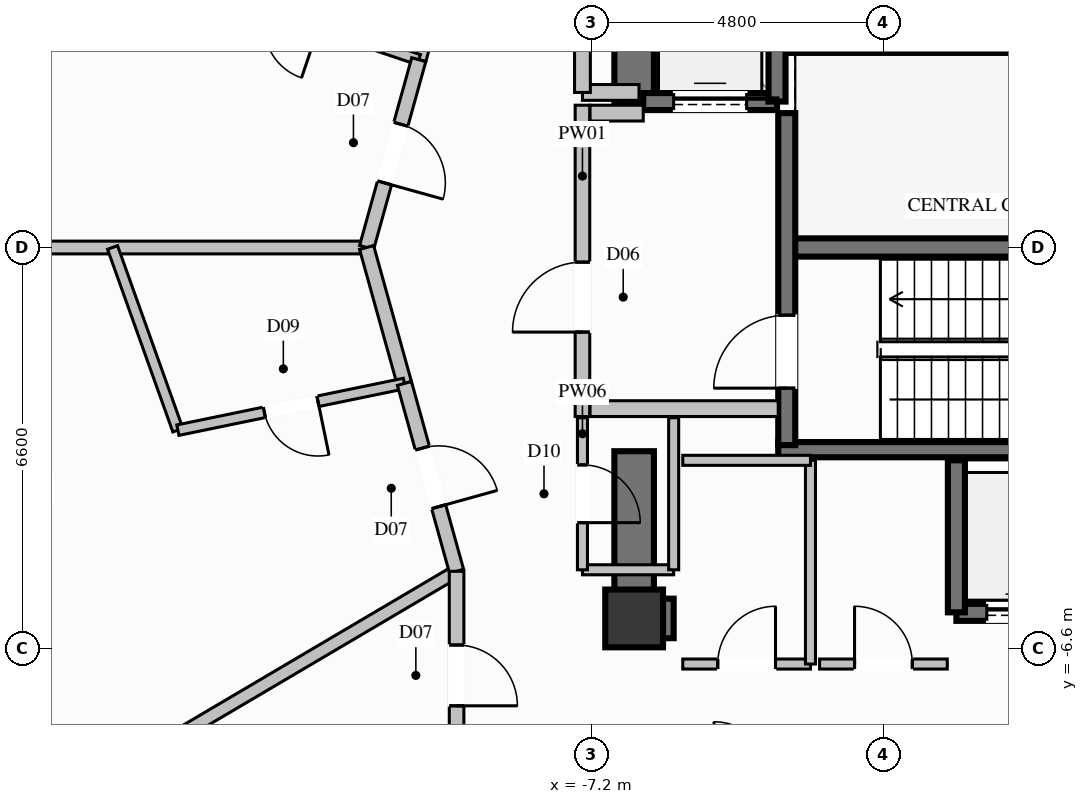
"""IFC4 building model, lengths in metres.
Left out: names, types, materials, properties, quantities, classifications, styles, units other than length and angle.
Written with IfcOpenShell. Run it as: python <this file> out.ifc"""

import sys

from ifc_helpers import new_model, si_unit, direction, frame, frame_2d, origin, origin_2d, place, context, subcontext, project, spatial, rectangle, extrude, element, fill, save


model = new_model("IFC4")
c1 = context("Model", 3, precision=1e-05, world=origin(), true_north=direction((0.0, 1.0)))
c2 = subcontext(c1, "Body", "Model", "MODEL_VIEW")
j1 = project(units=[si_unit("LENGTHUNIT", "METRE"), si_unit("PLANEANGLEUNIT", "RADIAN")], contexts=[c1])
p1 = place(None, origin())
s1 = spatial("IfcSite", under=j1, at=p1, CompositionType="ELEMENT")
p2 = place(p1, origin())
s2 = spatial("IfcBuilding", under=s1, at=p2, CompositionType="ELEMENT")
p3 = place(p2, frame((0.0, 0.0, 131.4)))
s3 = spatial("IfcBuildingStorey", under=s2, at=p3, CompositionType="ELEMENT", Elevation=131.4)
p4 = place(p3, frame((-6.5, -6.1, 0.0), z_axis=(0.0, 0.0, 1.0), x_axis=(1.0, 0.0, 0.0)))
e1 = element("IfcColumn", 1, at=p4, inside=s3, PredefinedType="COLUMN", context=c2, shape_type="SweptSolid", body=[
    extrude(rectangle(XDim=0.95, YDim=0.95, at=origin_2d()), origin(), (0.0, 0.0, 1.0), 3.6),
])
p5 = place(p3, frame((-3.99, 0.0, 0.0), z_axis=(0.0, 0.0, 1.0), x_axis=(1.0, 0.0, 0.0)))
e2 = element("IfcWall", 2, at=p5, inside=s3, PredefinedType="SHEAR", context=c2, shape_type="SweptSolid", body=[
    extrude(rectangle(XDim=7.98, YDim=0.3, at=frame_2d((3.99, 0.0))), origin(), (0.0, 0.0, 1.0), 3.6),
])
for number, where, z_axis, x_axis in (
    (3, (-4.13, -3.325, 0.0), (0.0, 0.0, 1.0), (1.0, 0.0, 0.0)),
    (4, (-4.13, 3.325, 0.0), (0.0, 0.0, 1.0), (1.0, 0.0, 0.0)),
):
    element("IfcWall", number, at=place(p3, frame(where, z_axis=z_axis, x_axis=x_axis)), inside=s3, PredefinedType="SOLIDWALL", context=c2, shape_type="SweptSolid", body=[
        extrude(rectangle(XDim=8.26, YDim=0.25, at=frame_2d((4.13, 0.0))), origin(), (0.0, 0.0, 1.0), 3.6),
    ])
p6 = place(p3, frame((-6.175, -6.1, 0.0), z_axis=(0.0, 0.0, 1.0), x_axis=(1.0, 0.0, 0.0)))
e5 = element("IfcWall", 5, at=p6, inside=s3, PredefinedType="SHEAR", context=c2, shape_type="SweptSolid", body=[
    extrude(rectangle(XDim=0.325, YDim=0.65, at=frame_2d((0.163, 0.0))), origin(), (0.0, 0.0, 1.0), 3.6),
])
p7 = place(p3, frame((-6.5, 2.35, 0.0), z_axis=(0.0, 0.0, 1.0), x_axis=(0.0, 1.0, 0.0)))
e6 = element("IfcWall", 6, at=p7, inside=s3, PredefinedType="SHEAR", context=c2, shape_type="SweptSolid", body=[
    extrude(rectangle(XDim=4.075, YDim=0.65, at=frame_2d((2.038, 0.0))), origin(), (0.0, 0.0, 1.0), 3.6),
])
p8 = place(p3, frame((-6.5, -6.425, 0.0), z_axis=(0.0, 0.0, 1.0), x_axis=(0.0, 1.0, 0.0)))
e7 = element("IfcWall", 7, at=p8, inside=s3, PredefinedType="SHEAR", context=c2, shape_type="SweptSolid", body=[
    extrude(rectangle(XDim=3.075, YDim=0.65, at=frame_2d((1.538, 0.0))), origin(), (0.0, 0.0, 1.0), 3.6),
])
p9 = place(p3, frame((-1.2, -6.0, 0.0), z_axis=(0.0, 0.0, 1.0), x_axis=(1.0, 0.0, 0.0)))
e8 = element("IfcWall", 8, at=p9, inside=s3, PredefinedType="SOLIDWALL", context=c2, shape_type="SweptSolid", body=[
    extrude(rectangle(XDim=2.1, YDim=0.28, at=frame_2d((1.05, 0.0))), origin(), (0.0, 0.0, 1.0), 3.35),
])
p10 = place(p9, frame((0.5, 0.0, 0.0)))
e9 = element("IfcOpeningElement", 9, at=p10, cuts=e8, PredefinedType="OPENING", context=c2, shape_type="SweptSolid", body=[
    extrude(rectangle(XDim=1.1, YDim=2.2, at=frame_2d((0.55, 1.1))), frame((0.0, 0.15, 0.0), z_axis=(0.0, -1.0, 0.0), x_axis=(1.0, 0.0, 0.0)), (0.0, 0.0, 1.0), 0.3),
])
p11 = place(p3, frame((-1.2, -3.5, 0.0), z_axis=(0.0, 0.0, 1.0), x_axis=(0.0, -1.0, 0.0)))
e10 = element("IfcWall", 10, at=p11, inside=s3, PredefinedType="SOLIDWALL", context=c2, shape_type="SweptSolid", body=[
    extrude(rectangle(XDim=2.5, YDim=0.28, at=frame_2d((1.25, 0.0))), origin(), (0.0, 0.0, 1.0), 3.35),
])
p12 = place(p3, frame((-6.35, 2.4, 0.0), z_axis=(0.0, 0.0, 1.0), x_axis=(1.0, 0.0, 0.0)))
e11 = element("IfcWall", 11, at=p12, inside=s3, PredefinedType="SOLIDWALL", context=c2, shape_type="SweptSolid", body=[
    extrude(rectangle(XDim=2.2, YDim=0.28, at=frame_2d((1.1, 0.0))), origin(), (0.0, 0.0, 1.0), 3.35),
])
p13 = place(p12, frame((0.5, 0.0, 0.0)))
e12 = element("IfcOpeningElement", 12, at=p13, cuts=e11, PredefinedType="OPENING", context=c2, shape_type="SweptSolid", body=[
    extrude(rectangle(XDim=1.2, YDim=2.2, at=frame_2d((0.6, 1.1))), frame((0.0, 0.15, 0.0), z_axis=(0.0, -1.0, 0.0), x_axis=(1.0, 0.0, 0.0)), (0.0, 0.0, 1.0), 0.3),
])
p14 = place(p3, frame((-4.15, 2.4, 0.0), z_axis=(0.0, 0.0, 1.0), x_axis=(0.0, 1.0, 0.0)))
e13 = element("IfcWall", 13, at=p14, inside=s3, PredefinedType="SOLIDWALL", context=c2, shape_type="SweptSolid", body=[
    extrude(rectangle(XDim=2.7, YDim=0.28, at=frame_2d((1.35, 0.0))), origin(), (0.0, 0.0, 1.0), 3.35),
])
p15 = place(p3, frame((-3.99, -3.25, 0.0), z_axis=(0.0, 0.0, 1.0), x_axis=(0.0, 1.0, 0.0)))
e14 = element("IfcWall", 14, at=p15, inside=s3, PredefinedType="SOLIDWALL", context=c2, shape_type="SweptSolid", body=[
    extrude(rectangle(XDim=5.46, YDim=0.28, at=frame_2d((2.73, 0.0))), origin(), (0.0, 0.0, 1.0), 3.35),
])
p16 = place(p15, frame((0.937, 0.0, 0.0)))
e15 = element("IfcOpeningElement", 15, at=p16, cuts=e14, PredefinedType="OPENING", context=c2, shape_type="SweptSolid", body=[
    extrude(rectangle(XDim=1.2, YDim=2.2, at=frame_2d((0.6, 1.1))), frame((0.0, 0.15, 0.0), z_axis=(0.0, -1.0, 0.0), x_axis=(1.0, 0.0, 0.0)), (0.0, 0.0, 1.0), 0.3),
])
p17 = place(p3, frame((-7.35, -2.78, 0.0), z_axis=(0.0, 0.0, 1.0), x_axis=(0.0, 1.0, 0.0)))
e16 = element("IfcWall", 16, at=p17, inside=s3, PredefinedType="PARTITIONING", context=c2, shape_type="SweptSolid", body=[
    extrude(rectangle(XDim=5.12, YDim=0.24, at=frame_2d((2.56, 0.0))), origin(), (0.0, 0.0, 1.0), 2.435),
])
p18 = place(p17, frame((1.389, 0.0, 0.0)))
e17 = element("IfcOpeningElement", 17, at=p18, cuts=e16, PredefinedType="OPENING", context=c2, shape_type="SweptSolid", body=[
    extrude(rectangle(XDim=1.15, YDim=2.2, at=frame_2d((0.575, 1.1))), frame((0.0, 0.13, 0.0), z_axis=(0.0, -1.0, 0.0), x_axis=(1.0, 0.0, 0.0)), (0.0, 0.0, 1.0), 0.26),
])
p19 = place(p3, frame((-7.225, -2.65, 0.0), z_axis=(0.0, 0.0, 1.0), x_axis=(1.0, 0.0, 0.0)))
e18 = element("IfcWall", 18, at=p19, inside=s3, PredefinedType="PARTITIONING", context=c2, shape_type="SweptSolid", body=[
    extrude(rectangle(XDim=3.095, YDim=0.26, at=frame_2d((1.548, 0.0))), origin(), (0.0, 0.0, 1.0), 3.35),
])
p20 = place(p3, frame((-7.225, 2.21, 0.0), z_axis=(0.0, 0.0, 1.0), x_axis=(1.0, 0.0, 0.0)))
e19 = element("IfcWall", 19, at=p20, inside=s3, PredefinedType="PARTITIONING", context=c2, shape_type="SweptSolid", body=[
    extrude(rectangle(XDim=0.875, YDim=0.26, at=frame_2d((0.438, 0.0))), origin(), (0.0, 0.0, 1.0), 3.35),
])
p21 = place(p3, frame((-7.35, 2.55, 0.0), z_axis=(0.0, 0.0, 1.0), x_axis=(1.0, 0.0, 0.0)))
e20 = element("IfcWall", 20, at=p21, inside=s3, PredefinedType="PARTITIONING", context=c2, shape_type="SweptSolid", body=[
    extrude(rectangle(XDim=0.93, YDim=0.26, at=frame_2d((0.465, 0.0))), origin(), (0.0, 0.0, 1.0), 3.35),
])
p22 = place(p3, frame((-7.35, 2.55, 0.0), z_axis=(0.0, 0.0, 1.0), x_axis=(0.0, 1.0, 0.0)))
e21 = element("IfcWall", 21, at=p22, inside=s3, PredefinedType="PARTITIONING", context=c2, shape_type="SweptSolid", body=[
    extrude(rectangle(XDim=2.4, YDim=0.26, at=frame_2d((1.2, 0.0))), origin(), (0.0, 0.0, 1.0), 2.435),
])
p23 = place(p22, frame((0.775, 0.0, 0.0)))
e22 = element("IfcOpeningElement", 22, at=p23, cuts=e21, PredefinedType="OPENING", context=c2, shape_type="SweptSolid", body=[
    extrude(rectangle(XDim=0.85, YDim=2.05, at=frame_2d((0.425, 1.025))), frame((0.0, 0.14, 0.0), z_axis=(0.0, -1.0, 0.0), x_axis=(1.0, 0.0, 0.0)), (0.0, 0.0, 1.0), 0.28),
])
p24 = place(p3, frame((-7.35, -5.3, 0.0), z_axis=(0.0, 0.0, 1.0), x_axis=(1.0, 0.0, 0.0)))
e23 = element("IfcWall", 23, at=p24, inside=s3, PredefinedType="PARTITIONING", context=c2, shape_type="SweptSolid", body=[
    extrude(rectangle(XDim=1.5, YDim=0.165, at=frame_2d((0.75, 0.0))), origin(), (0.0, 0.0, 1.0), 2.435),
])
p25 = place(p3, frame((-5.85, -5.3, 0.0), z_axis=(0.0, 0.0, 1.0), x_axis=(0.0, 1.0, 0.0)))
e24 = element("IfcWall", 24, at=p25, inside=s3, PredefinedType="PARTITIONING", context=c2, shape_type="SweptSolid", body=[
    extrude(rectangle(XDim=2.5, YDim=0.165, at=frame_2d((1.25, 0.0))), origin(), (0.0, 0.0, 1.0), 2.435),
])
p26 = place(p3, frame((-7.35, -2.8, 0.0), z_axis=(0.0, 0.0, 1.0), x_axis=(0.0, -1.0, 0.0)))
e25 = element("IfcWall", 25, at=p26, inside=s3, PredefinedType="PARTITIONING", context=c2, shape_type="SweptSolid", body=[
    extrude(rectangle(XDim=2.5, YDim=0.165, at=frame_2d((1.25, 0.0))), origin(), (0.0, 0.0, 1.0), 3.35),
])
p27 = place(p26, frame((0.775, 0.0, 0.0)))
e26 = element("IfcOpeningElement", 26, at=p27, cuts=e25, PredefinedType="OPENING", context=c2, shape_type="SweptSolid", body=[
    extrude(rectangle(XDim=0.95, YDim=2.1, at=frame_2d((0.475, 1.05))), frame((0.0, 0.093, 0.0), z_axis=(0.0, -1.0, 0.0), x_axis=(1.0, 0.0, 0.0)), (0.0, 0.0, 1.0), 0.185),
])
p28 = place(p3, frame((-5.7, -6.85, 0.0), z_axis=(0.0, 0.0, 1.0), x_axis=(1.0, 0.0, 0.0)))
e27 = element("IfcWall", 27, at=p28, inside=s3, PredefinedType="PARTITIONING", context=c2, shape_type="SweptSolid", body=[
    extrude(rectangle(XDim=2.1, YDim=0.165, at=frame_2d((1.05, 0.0))), origin(), (0.0, 0.0, 1.0), 2.435),
])
p29 = place(p28, frame((0.575, 0.0, 0.0)))
e28 = element("IfcOpeningElement", 28, at=p29, cuts=e27, PredefinedType="OPENING", context=c2, shape_type="SweptSolid", body=[
    extrude(rectangle(XDim=0.95, YDim=2.1, at=frame_2d((0.475, 1.05))), frame((0.0, 0.093, 0.0), z_axis=(0.0, -1.0, 0.0), x_axis=(1.0, 0.0, 0.0)), (0.0, 0.0, 1.0), 0.185),
])
p30 = place(p3, frame((-3.6, -6.85, 0.0), z_axis=(0.0, 0.0, 1.0), x_axis=(0.0, 1.0, 0.0)))
e29 = element("IfcWall", 29, at=p30, inside=s3, PredefinedType="PARTITIONING", context=c2, shape_type="SweptSolid", body=[
    extrude(rectangle(XDim=3.35, YDim=0.165, at=frame_2d((1.675, 0.0))), origin(), (0.0, 0.0, 1.0), 3.35),
])
p31 = place(p3, frame((-3.6, -3.5, 0.0), z_axis=(0.0, 0.0, 1.0), x_axis=(-1.0, 0.0, 0.0)))
e30 = element("IfcWall", 30, at=p31, inside=s3, PredefinedType="PARTITIONING", context=c2, shape_type="SweptSolid", body=[
    extrude(rectangle(XDim=2.1, YDim=0.165, at=frame_2d((1.05, 0.0))), origin(), (0.0, 0.0, 1.0), 3.35),
])
p32 = place(p3, frame((-3.45, -6.85, 0.0), z_axis=(0.0, 0.0, 1.0), x_axis=(1.0, 0.0, 0.0)))
e31 = element("IfcWall", 31, at=p32, inside=s3, PredefinedType="PARTITIONING", context=c2, shape_type="SweptSolid", body=[
    extrude(rectangle(XDim=2.1, YDim=0.165, at=frame_2d((1.05, 0.0))), origin(), (0.0, 0.0, 1.0), 2.435),
])
p33 = place(p32, frame((0.575, 0.0, 0.0)))
e32 = element("IfcOpeningElement", 32, at=p33, cuts=e31, PredefinedType="OPENING", context=c2, shape_type="SweptSolid", body=[
    extrude(rectangle(XDim=0.95, YDim=2.1, at=frame_2d((0.475, 1.05))), frame((0.0, 0.093, 0.0), z_axis=(0.0, -1.0, 0.0), x_axis=(1.0, 0.0, 0.0)), (0.0, 0.0, 1.0), 0.185),
])
p34 = place(p3, frame((-10.9, 0.0, 0.0), z_axis=(0.0, 0.0, 1.0), x_axis=(-1.0, 0.0, 0.0)))
e33 = element("IfcWall", 33, at=p34, inside=s3, PredefinedType="PARTITIONING", context=c2, shape_type="SweptSolid", body=[
    extrude(rectangle(XDim=5.555, YDim=0.21, at=frame_2d((2.778, 0.0))), origin(), (0.0, 0.0, 1.0), 3.35),
])
p35 = place(p3, frame((-9.42, -5.325, 0.0), z_axis=(0.0, 0.0, 1.0), x_axis=(-0.861378052692, -0.507964418381, 0.0)))
e34 = element("IfcWall", 34, at=p35, inside=s3, PredefinedType="PARTITIONING", context=c2, shape_type="SweptSolid", body=[
    extrude(rectangle(XDim=5.636, YDim=0.21, at=frame_2d((2.818, 0.0))), origin(), (0.0, 0.0, 1.0), 2.791),
])
p36 = place(p3, frame((-9.42, 5.325, 0.0), z_axis=(0.0, 0.0, 1.0), x_axis=(-0.268045342481, -0.963406297662, 0.0)))
e35 = element("IfcWall", 35, at=p36, inside=s3, PredefinedType="PARTITIONING", context=c2, shape_type="SweptSolid", body=[
    extrude(rectangle(XDim=2.321, YDim=0.24, at=frame_2d((1.16, 0.0))), origin(), (0.0, 0.0, 1.0), 3.35),
])
p37 = place(p3, frame((-10.042, 3.089, 0.0), z_axis=(0.0, 0.0, 1.0), x_axis=(-0.947478496839, 0.319819477249, 0.0)))
e36 = element("IfcWall", 36, at=p37, inside=s3, PredefinedType="PLUMBINGWALL", context=c2, shape_type="SweptSolid", body=[
    extrude(rectangle(XDim=4.361, YDim=0.175, at=frame_2d((2.181, 0.0))), origin(), (0.0, 0.0, 1.0), 3.35),
])
p38 = place(p37, frame((1.731, 0.0, 0.0)))
e37 = element("IfcOpeningElement", 37, at=p38, cuts=e36, PredefinedType="OPENING", context=c2, shape_type="SweptSolid", body=[
    extrude(rectangle(XDim=0.9, YDim=2.1, at=frame_2d((0.45, 1.05))), frame((0.0, 0.098, 0.0), z_axis=(0.0, -1.0, 0.0), x_axis=(1.0, 0.0, 0.0)), (0.0, 0.0, 1.0), 0.195),
])
p39 = place(p3, frame((-10.042, 3.089, 0.0), z_axis=(0.0, 0.0, 1.0), x_axis=(-0.267592805492, -0.963532091032, 0.0)))
e38 = element("IfcWall", 38, at=p39, inside=s3, PredefinedType="PARTITIONING", context=c2, shape_type="SweptSolid", body=[
    extrude(rectangle(XDim=3.206, YDim=0.24, at=frame_2d((1.603, 0.0))), origin(), (0.0, 0.0, 1.0), 3.35),
])
p40 = place(p39, frame((1.103, 0.0, 0.0)))
e39 = element("IfcOpeningElement", 39, at=p40, cuts=e38, PredefinedType="OPENING", context=c2, shape_type="SweptSolid", body=[
    extrude(rectangle(XDim=1.0, YDim=2.2, at=frame_2d((0.5, 1.1))), frame((0.0, 0.13, 0.0), z_axis=(0.0, -1.0, 0.0), x_axis=(1.0, 0.0, 0.0)), (0.0, 0.0, 1.0), 0.26),
])
p41 = place(p3, frame((-10.9, 0.0, 0.0), z_axis=(0.0, 0.0, 1.0), x_axis=(0.267920543299, -0.963441011416, 0.0)))
e40 = element("IfcWall", 40, at=p41, inside=s3, PredefinedType="PARTITIONING", context=c2, shape_type="SweptSolid", body=[
    extrude(rectangle(XDim=2.321, YDim=0.24, at=frame_2d((1.161, 0.0))), origin(), (0.0, 0.0, 1.0), 3.35),
])
p42 = place(p3, frame((-15.078, 0.0, 0.0), z_axis=(0.0, 0.0, 1.0), x_axis=(0.336656350005, -0.941627581373, 0.0)))
e41 = element("IfcWall", 41, at=p42, inside=s3, PredefinedType="PLUMBINGWALL", context=c2, shape_type="SweptSolid", body=[
    extrude(rectangle(XDim=3.19, YDim=0.175, at=frame_2d((1.595, 0.0))), origin(), (0.0, 0.0, 1.0), 3.35),
])
p43 = place(p3, frame((-10.278, -2.236, 0.0), z_axis=(0.0, 0.0, 1.0), x_axis=(-0.979418625289, -0.201839432313, 0.0)))
e42 = element("IfcWall", 42, at=p43, inside=s3, PredefinedType="PLUMBINGWALL", context=c2, shape_type="SweptSolid", body=[
    extrude(rectangle(XDim=3.804, YDim=0.175, at=frame_2d((1.902, 0.0))), origin(), (0.0, 0.0, 1.0), 3.35),
])
p44 = place(p43, frame((1.452, 0.0, 0.0)))
e43 = element("IfcOpeningElement", 43, at=p44, cuts=e42, PredefinedType="OPENING", context=c2, shape_type="SweptSolid", body=[
    extrude(rectangle(XDim=0.9, YDim=2.1, at=frame_2d((0.45, 1.05))), frame((0.0, 0.098, 0.0), z_axis=(0.0, -1.0, 0.0), x_axis=(1.0, 0.0, 0.0)), (0.0, 0.0, 1.0), 0.195),
])
p45 = place(p3, frame((-10.278, -2.236, 0.0), z_axis=(0.0, 0.0, 1.0), x_axis=(0.267683140967, -0.96350699844, 0.0)))
e44 = element("IfcWall", 44, at=p45, inside=s3, PredefinedType="PARTITIONING", context=c2, shape_type="SweptSolid", body=[
    extrude(rectangle(XDim=3.206, YDim=0.24, at=frame_2d((1.603, 0.0))), origin(), (0.0, 0.0, 1.0), 3.35),
])
p46 = place(p45, frame((1.103, 0.0, 0.0)))
e45 = element("IfcOpeningElement", 45, at=p46, cuts=e44, PredefinedType="OPENING", context=c2, shape_type="SweptSolid", body=[
    extrude(rectangle(XDim=1.0, YDim=2.2, at=frame_2d((0.5, 1.1))), frame((0.0, 0.13, 0.0), z_axis=(0.0, -1.0, 0.0), x_axis=(1.0, 0.0, 0.0)), (0.0, 0.0, 1.0), 0.26),
])
p47 = place(p3, frame((-9.42, -5.325, 0.0), z_axis=(0.0, 0.0, 1.0), x_axis=(0.0, -1.0, 0.0)))
e46 = element("IfcWall", 46, at=p47, inside=s3, PredefinedType="PARTITIONING", context=c2, shape_type="SweptSolid", body=[
    extrude(rectangle(XDim=3.425, YDim=0.24, at=frame_2d((1.712, 0.0))), origin(), (0.0, 0.0, 1.0), 3.35),
])
p48 = place(p47, frame((1.212, 0.0, 0.0)))
e47 = element("IfcOpeningElement", 47, at=p48, cuts=e46, PredefinedType="OPENING", context=c2, shape_type="SweptSolid", body=[
    extrude(rectangle(XDim=1.0, YDim=2.2, at=frame_2d((0.5, 1.1))), frame((0.0, 0.13, 0.0), z_axis=(0.0, -1.0, 0.0), x_axis=(1.0, 0.0, 0.0)), (0.0, 0.0, 1.0), 0.26),
])
p49 = place(p10, origin())
e48 = element("IfcDoor", 48, at=p49, inside=s3, OperationType="SLIDING_TO_LEFT", PredefinedType="DOOR", context=c2, shape_type="SweptSolid", body=[
    extrude(rectangle(XDim=1.1, YDim=2.2, at=frame_2d((0.55, 1.1))), frame((0.0, 0.025, 0.0), z_axis=(0.0, -1.0, 0.0), x_axis=(1.0, 0.0, 0.0)), (0.0, 0.0, 1.0), 0.05),
])
fill(e9, e48)
p50 = place(p13, origin())
e49 = element("IfcDoor", 49, at=p50, inside=s3, OperationType="SLIDING_TO_LEFT", PredefinedType="DOOR", context=c2, shape_type="SweptSolid", body=[
    extrude(rectangle(XDim=1.2, YDim=2.2, at=frame_2d((0.6, 1.1))), frame((0.0, 0.025, 0.0), z_axis=(0.0, -1.0, 0.0), x_axis=(1.0, 0.0, 0.0)), (0.0, 0.0, 1.0), 0.05),
])
fill(e12, e49)
p51 = place(p16, origin())
e50 = element("IfcDoor", 50, at=p51, inside=s3, OperationType="SINGLE_SWING_LEFT", PredefinedType="DOOR", context=c2, shape_type="SweptSolid", body=[
    extrude(rectangle(XDim=1.2, YDim=2.2, at=frame_2d((0.6, 1.1))), frame((0.0, 0.025, 0.0), z_axis=(0.0, -1.0, 0.0), x_axis=(1.0, 0.0, 0.0)), (0.0, 0.0, 1.0), 0.05),
])
fill(e15, e50)
p52 = place(p18, origin())
e51 = element("IfcDoor", 51, at=p52, inside=s3, OperationType="SINGLE_SWING_LEFT", PredefinedType="DOOR", context=c2, shape_type="SweptSolid", body=[
    extrude(rectangle(XDim=1.15, YDim=2.2, at=frame_2d((0.575, 1.1))), frame((0.0, 0.025, 0.0), z_axis=(0.0, -1.0, 0.0), x_axis=(1.0, 0.0, 0.0)), (0.0, 0.0, 1.0), 0.05),
])
fill(e17, e51)
p53 = place(p27, origin())
e52 = element("IfcDoor", 52, at=p53, inside=s3, OperationType="SINGLE_SWING_RIGHT", PredefinedType="DOOR", context=c2, shape_type="SweptSolid", body=[
    extrude(rectangle(XDim=0.95, YDim=2.1, at=frame_2d((0.475, 1.05))), frame((0.0, 0.025, 0.0), z_axis=(0.0, -1.0, 0.0), x_axis=(1.0, 0.0, 0.0)), (0.0, 0.0, 1.0), 0.05),
])
fill(e26, e52)
p54 = place(p29, origin())
e53 = element("IfcDoor", 53, at=p54, inside=s3, OperationType="SINGLE_SWING_RIGHT", PredefinedType="DOOR", context=c2, shape_type="SweptSolid", body=[
    extrude(rectangle(XDim=0.95, YDim=2.1, at=frame_2d((0.475, 1.05))), frame((0.0, 0.025, 0.0), z_axis=(0.0, -1.0, 0.0), x_axis=(1.0, 0.0, 0.0)), (0.0, 0.0, 1.0), 0.05),
])
fill(e28, e53)
p55 = place(p33, origin())
e54 = element("IfcDoor", 54, at=p55, inside=s3, OperationType="SINGLE_SWING_LEFT", PredefinedType="DOOR", context=c2, shape_type="SweptSolid", body=[
    extrude(rectangle(XDim=0.95, YDim=2.1, at=frame_2d((0.475, 1.05))), frame((0.0, 0.025, 0.0), z_axis=(0.0, -1.0, 0.0), x_axis=(1.0, 0.0, 0.0)), (0.0, 0.0, 1.0), 0.05),
])
fill(e32, e54)
p56 = place(p40, origin())
e55 = element("IfcDoor", 55, at=p56, inside=s3, OperationType="SINGLE_SWING_RIGHT", PredefinedType="DOOR", context=c2, shape_type="SweptSolid", body=[
    extrude(rectangle(XDim=1.0, YDim=2.2, at=frame_2d((0.5, 1.1))), frame((0.0, 0.025, 0.0), z_axis=(0.0, -1.0, 0.0), x_axis=(1.0, 0.0, 0.0)), (0.0, 0.0, 1.0), 0.05),
])
fill(e39, e55)
p57 = place(p44, origin())
e56 = element("IfcDoor", 56, at=p57, inside=s3, OperationType="SINGLE_SWING_LEFT", PredefinedType="DOOR", context=c2, shape_type="SweptSolid", body=[
    extrude(rectangle(XDim=0.9, YDim=2.1, at=frame_2d((0.45, 1.05))), frame((0.0, 0.025, 0.0), z_axis=(0.0, -1.0, 0.0), x_axis=(1.0, 0.0, 0.0)), (0.0, 0.0, 1.0), 0.05),
])
fill(e43, e56)
p58 = place(p46, origin())
e57 = element("IfcDoor", 57, at=p58, inside=s3, OperationType="SINGLE_SWING_RIGHT", PredefinedType="DOOR", context=c2, shape_type="SweptSolid", body=[
    extrude(rectangle(XDim=1.0, YDim=2.2, at=frame_2d((0.5, 1.1))), frame((0.0, 0.025, 0.0), z_axis=(0.0, -1.0, 0.0), x_axis=(1.0, 0.0, 0.0)), (0.0, 0.0, 1.0), 0.05),
])
fill(e45, e57)
p59 = place(p48, origin())
e58 = element("IfcDoor", 58, at=p59, inside=s3, OperationType="SINGLE_SWING_RIGHT", PredefinedType="DOOR", context=c2, shape_type="SweptSolid", body=[
    extrude(rectangle(XDim=1.0, YDim=2.2, at=frame_2d((0.5, 1.1))), frame((0.0, 0.025, 0.0), z_axis=(0.0, -1.0, 0.0), x_axis=(1.0, 0.0, 0.0)), (0.0, 0.0, 1.0), 0.05),
])
fill(e47, e58)
save(model, sys.argv[1])
